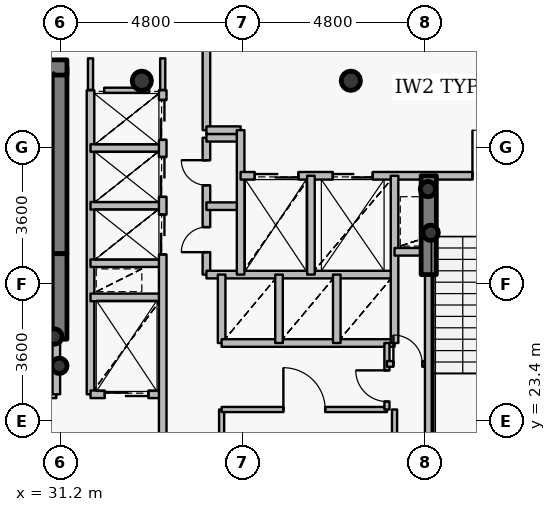
"""IFC4 building model, lengths in metres.
Left out: names, types, materials, properties, quantities, classifications, styles, units other than length and angle.
Written with IfcOpenShell. Run it as: python <this file> out.ifc"""

import sys

from ifc_helpers import new_model, si_unit, direction, frame, frame_2d, origin, origin_2d, place, context, subcontext, project, spatial, rectangle, hollow_circle, extrude, source, transform, mapped, element, fill, save


model = new_model("IFC4")
c1 = context("Model", 3, precision=1e-05, world=origin(), true_north=direction((0.0, 1.0)))
c2 = subcontext(c1, "Body", "Model", "MODEL_VIEW")
j1 = project(units=[si_unit("LENGTHUNIT", "METRE"), si_unit("PLANEANGLEUNIT", "RADIAN")], contexts=[c1])
p1 = place(None, origin())
s1 = spatial("IfcSite", under=j1, at=p1, CompositionType="ELEMENT")
p2 = place(p1, origin())
s2 = spatial("IfcBuilding", under=s1, at=p2, CompositionType="ELEMENT")
p3 = place(p2, frame((0.0, 0.0, 182.4)))
s3 = spatial("IfcBuildingStorey", under=s2, at=p3, CompositionType="ELEMENT", Elevation=182.4)
for number, where, z_axis, x_axis in (
    (1, (38.85, 32.35, 0.0), (0.0, 0.0, 1.0), (1.0, 0.0, 0.0)),
    (2, (33.35, 32.35, 0.0), (0.0, 0.0, 1.0), (1.0, 0.0, 0.0)),
):
    element("IfcColumn", number, at=place(p3, frame(where, z_axis=z_axis, x_axis=x_axis)), inside=s3, PredefinedType="COLUMN", context=c2, shape_type="SweptSolid", body=[
        extrude(hollow_circle(Radius=0.254, WallThickness=0.02, at=origin_2d()), origin(), (0.0, 0.0, 1.0), 3.75),
    ])
p4 = place(p3, frame((31.18, 27.8, 0.0), z_axis=(0.0, 0.0, 1.0), x_axis=(0.0, 1.0, 0.0)))
e3 = element("IfcWall", 3, at=p4, inside=s3, PredefinedType="SHEAR", context=c2, shape_type="SweptSolid", body=[
    extrude(rectangle(XDim=4.9, YDim=0.4, at=frame_2d((2.45, 0.0))), origin(), (0.0, 0.0, 1.0), 3.75),
])
p5 = place(p3, frame((27.28, 32.7, 0.0), z_axis=(0.0, 0.0, 1.0), x_axis=(1.0, 0.0, 0.0)))
e4 = element("IfcWall", 4, at=p5, inside=s3, PredefinedType="SHEAR", context=c2, shape_type="SweptSolid", body=[
    extrude(rectangle(XDim=4.1, YDim=0.4, at=frame_2d((2.05, 0.0))), origin(), (0.0, 0.0, 1.0), 3.75),
])
for number, where, z_axis, x_axis in (
    (5, (31.05, 25.62, 0.0), (0.0, 0.0, 1.0), (1.0, 0.0, 0.0)),
    (6, (31.18, 24.85, 0.0), (0.0, 0.0, 1.0), (1.0, 0.0, 0.0)),
    (7, (40.95, 28.35, 0.0), (0.0, 0.0, 1.0), (1.0, 0.0, 0.0)),
    (8, (40.88, 29.5, 0.0), (0.0, 0.0, 1.0), (1.0, 0.0, 0.0)),
):
    element("IfcColumn", number, at=place(p3, frame(where, z_axis=z_axis, x_axis=x_axis)), inside=s3, PredefinedType="COLUMN", context=c2, shape_type="SweptSolid", body=[
        extrude(hollow_circle(Radius=0.203, WallThickness=0.016, at=origin_2d()), origin(), (0.0, 0.0, 1.0), 3.75),
    ])
p6 = place(p3, frame((31.18, 25.55, 0.0), z_axis=(0.0, 0.0, 1.0), x_axis=(0.0, 1.0, 0.0)))
e9 = element("IfcWall", 9, at=p6, inside=s3, PredefinedType="SHEAR", context=c2, shape_type="SweptSolid", body=[
    extrude(rectangle(XDim=2.25, YDim=0.4, at=frame_2d((1.125, 0.0))), origin(), (0.0, 0.0, 1.0), 3.1),
])
p7 = place(p3, frame((40.9, 27.25, 0.0), z_axis=(0.0, 0.0, 1.0), x_axis=(0.0, 1.0, 0.0)))
e10 = element("IfcWall", 10, at=p7, inside=s3, PredefinedType="SHEAR", context=c2, shape_type="SweptSolid", body=[
    extrude(rectangle(XDim=2.6, YDim=0.4, at=frame_2d((1.3, 0.0))), origin(), (0.0, 0.0, 1.0), 3.1),
])
p8 = place(p3, frame((27.56, 24.1, 0.0), z_axis=(0.0, 0.0, 1.0), x_axis=(1.0, 0.0, 0.0)))
e11 = element("IfcWall", 11, at=p8, inside=s3, PredefinedType="PARTITIONING", context=c2, shape_type="SweptSolid", body=[
    extrude(rectangle(XDim=3.54, YDim=0.2, at=frame_2d((1.77, 0.0))), origin(), (0.0, 0.0, 1.0), 3.5),
])
p9 = place(p8, frame((1.17, 0.0, 0.0)))
e12 = element("IfcOpeningElement", 12, at=p9, cuts=e11, PredefinedType="OPENING", context=c2, shape_type="SweptSolid", body=[
    extrude(rectangle(XDim=1.2, YDim=2.15, at=origin_2d()), frame((0.6, 0.11, 1.075), z_axis=(0.0, -1.0, 0.0), x_axis=(1.0, 0.0, 0.0)), (0.0, 0.0, 1.0), 0.22),
])
p10 = place(p3, frame((31.1, 24.1, 0.0), z_axis=(0.0, 0.0, 1.0), x_axis=(0.0, 1.0, 0.0)))
e13 = element("IfcWall", 13, at=p10, inside=s3, PredefinedType="PARTITIONING", context=c2, shape_type="SweptSolid", body=[
    extrude(rectangle(XDim=1.44, YDim=0.2, at=frame_2d((0.72, 0.0))), origin(), (0.0, 0.0, 1.0), 3.5),
])
p11 = place(p3, frame((32.0, 24.1, 0.0), z_axis=(0.0, 0.0, 1.0), x_axis=(0.0, 1.0, 0.0)))
e14 = element("IfcWall", 14, at=p11, inside=s3, PredefinedType="PARTITIONING", context=c2, shape_type="SweptSolid", body=[
    extrude(rectangle(XDim=8.0, YDim=0.2, at=frame_2d((4.0, 0.0))), origin(), (0.0, 0.0, 1.0), 3.5),
])
p12 = place(p3, frame((32.0, 24.1, 0.0), z_axis=(0.0, 0.0, 1.0), x_axis=(1.0, 0.0, 0.0)))
e15 = element("IfcWall", 15, at=p12, inside=s3, PredefinedType="PARTITIONING", context=c2, shape_type="SweptSolid", body=[
    extrude(rectangle(XDim=1.9, YDim=0.2, at=frame_2d((0.95, 0.0))), origin(), (0.0, 0.0, 1.0), 3.085),
])
p13 = place(p12, frame((0.375, 0.0, 0.0)))
e16 = element("IfcOpeningElement", 16, at=p13, cuts=e15, PredefinedType="OPENING", context=c2, shape_type="SweptSolid", body=[
    extrude(rectangle(XDim=1.15, YDim=2.15, at=origin_2d()), frame((0.575, 0.11, 1.075), z_axis=(0.0, -1.0, 0.0), x_axis=(1.0, 0.0, 0.0)), (0.0, 0.0, 1.0), 0.22),
])
for number, where, z_axis, x_axis in (
    (17, (32.0, 26.65, 0.0), (0.0, 0.0, 1.0), (1.0, 0.0, 0.0)),
    (18, (32.0, 27.55, 0.0), (0.0, 0.0, 1.0), (1.0, 0.0, 0.0)),
    (19, (32.0, 29.06, 0.0), (0.0, 0.0, 1.0), (1.0, 0.0, 0.0)),
    (20, (32.0, 30.58, 0.0), (0.0, 0.0, 1.0), (1.0, 0.0, 0.0)),
):
    element("IfcWall", number, at=place(p3, frame(where, z_axis=z_axis, x_axis=x_axis)), inside=s3, PredefinedType="PARTITIONING", context=c2, shape_type="SweptSolid", body=[
        extrude(rectangle(XDim=1.9, YDim=0.2, at=frame_2d((0.95, 0.0))), origin(), (0.0, 0.0, 1.0), 3.085),
    ])
p14 = place(p3, frame((33.9, 20.8, 0.0), z_axis=(0.0, 0.0, 1.0), x_axis=(0.0, 1.0, 0.0)))
e21 = element("IfcWall", 21, at=p14, inside=s3, PredefinedType="PARTITIONING", context=c2, shape_type="SweptSolid", body=[
    extrude(rectangle(XDim=11.3, YDim=0.2, at=frame_2d((5.65, 0.0))), origin(), (0.0, 0.0, 1.0), 3.085),
])
p15 = place(p14, frame((6.98, 0.0, 0.0)))
e22 = element("IfcOpeningElement", 22, at=p15, cuts=e21, PredefinedType="OPENING", context=c2, shape_type="SweptSolid", body=[
    extrude(rectangle(XDim=1.05, YDim=2.15, at=origin_2d()), frame((0.525, 0.11, 1.075), z_axis=(0.0, -1.0, 0.0), x_axis=(1.0, 0.0, 0.0)), (0.0, 0.0, 1.0), 0.22),
])
p16 = place(p14, frame((8.495, 0.0, 0.0)))
e23 = element("IfcOpeningElement", 23, at=p16, cuts=e21, PredefinedType="OPENING", context=c2, shape_type="SweptSolid", body=[
    extrude(rectangle(XDim=1.05, YDim=2.15, at=origin_2d()), frame((0.525, 0.11, 1.075), z_axis=(0.0, -1.0, 0.0), x_axis=(1.0, 0.0, 0.0)), (0.0, 0.0, 1.0), 0.22),
])
p17 = place(p14, frame((9.995, 0.0, 0.0)))
e24 = element("IfcOpeningElement", 24, at=p17, cuts=e21, PredefinedType="OPENING", context=c2, shape_type="SweptSolid", body=[
    extrude(rectangle(XDim=1.05, YDim=2.15, at=origin_2d()), frame((0.525, 0.11, 1.075), z_axis=(0.0, -1.0, 0.0), x_axis=(1.0, 0.0, 0.0)), (0.0, 0.0, 1.0), 0.22),
])
p18 = place(p3, frame((35.05, 27.25, 0.0), z_axis=(0.0, 0.0, 1.0), x_axis=(0.0, 1.0, 0.0)))
e25 = element("IfcWall", 25, at=p18, inside=s3, PredefinedType="PARTITIONING", context=c2, shape_type="SweptSolid", body=[
    extrude(rectangle(XDim=3.6, YDim=0.2, at=frame_2d((1.8, 0.0))), origin(), (0.0, 0.0, 1.0), 3.5),
])
p19 = place(p18, frame((0.59, 0.0, 0.0)))
e26 = element("IfcOpeningElement", 26, at=p19, cuts=e25, PredefinedType="OPENING", context=c2, shape_type="SweptSolid", body=[
    extrude(rectangle(XDim=0.66, YDim=2.05, at=origin_2d()), frame((0.33, 0.11, 1.025), z_axis=(0.0, -1.0, 0.0), x_axis=(1.0, 0.0, 0.0)), (0.0, 0.0, 1.0), 0.22),
])
p20 = place(p18, frame((2.35, 0.0, 0.0)))
e27 = element("IfcOpeningElement", 27, at=p20, cuts=e25, PredefinedType="OPENING", context=c2, shape_type="SweptSolid", body=[
    extrude(rectangle(XDim=0.66, YDim=2.05, at=origin_2d()), frame((0.33, 0.11, 1.025), z_axis=(0.0, -1.0, 0.0), x_axis=(1.0, 0.0, 0.0)), (0.0, 0.0, 1.0), 0.22),
])
p21 = place(p3, frame((35.05, 27.25, 0.0), z_axis=(0.0, 0.0, 1.0), x_axis=(1.0, 0.0, 0.0)))
e28 = element("IfcWall", 28, at=p21, inside=s3, PredefinedType="PARTITIONING", context=c2, shape_type="SweptSolid", body=[
    extrude(rectangle(XDim=4.95, YDim=0.2, at=frame_2d((2.475, 0.0))), origin(), (0.0, 0.0, 1.0), 3.085),
])
for number, where, z_axis, x_axis in (
    (29, (35.05, 29.05, 0.0), (0.0, 0.0, 1.0), (1.0, 0.0, 0.0)),
    (30, (35.05, 30.85, 0.0), (0.0, 0.0, 1.0), (1.0, 0.0, 0.0)),
):
    element("IfcWall", number, at=place(p3, frame(where, z_axis=z_axis, x_axis=x_axis)), inside=s3, PredefinedType="PARTITIONING", context=c2, shape_type="SweptSolid", body=[
        extrude(rectangle(XDim=0.9, YDim=0.2, at=frame_2d((0.45, 0.0))), origin(), (0.0, 0.0, 1.0), 3.5),
    ])
p22 = place(p3, frame((35.05, 31.05, 0.0), z_axis=(0.0, 0.0, 1.0), x_axis=(0.0, 1.0, 0.0)))
e31 = element("IfcWall", 31, at=p22, inside=s3, PredefinedType="PARTITIONING", context=c2, shape_type="SweptSolid", body=[
    extrude(rectangle(XDim=2.15, YDim=0.2, at=frame_2d((1.075, 0.0))), origin(), (0.0, 0.0, 1.0), 3.085),
])
p23 = place(p3, frame((35.05, 31.05, 0.0), z_axis=(0.0, 0.0, 1.0), x_axis=(1.0, 0.0, 0.0)))
e32 = element("IfcWall", 32, at=p23, inside=s3, PredefinedType="PARTITIONING", context=c2, shape_type="SweptSolid", body=[
    extrude(rectangle(XDim=0.9, YDim=0.2, at=frame_2d((0.45, 0.0))), origin(), (0.0, 0.0, 1.0), 3.5),
])
p24 = place(p3, frame((35.45, 20.8, 0.0), z_axis=(0.0, 0.0, 1.0), x_axis=(0.0, 1.0, 0.0)))
e33 = element("IfcWall", 33, at=p24, inside=s3, PredefinedType="PARTITIONING", context=c2, shape_type="SweptSolid", body=[
    extrude(rectangle(XDim=2.9, YDim=0.135, at=frame_2d((1.45, 0.0))), origin(), (0.0, 0.0, 1.0), 3.085),
])
p25 = place(p3, frame((35.45, 23.7, 0.0), z_axis=(0.0, 0.0, 1.0), x_axis=(1.0, 0.0, 0.0)))
e34 = element("IfcWall", 34, at=p25, inside=s3, PredefinedType="PARTITIONING", context=c2, shape_type="SweptSolid", body=[
    extrude(rectangle(XDim=4.35, YDim=0.135, at=frame_2d((2.175, 0.0))), origin(), (0.0, 0.0, 1.0), 3.085),
])
p26 = place(p25, frame((1.625, 0.0, 0.0)))
e35 = element("IfcOpeningElement", 35, at=p26, cuts=e34, PredefinedType="OPENING", context=c2, shape_type="SweptSolid", body=[
    extrude(rectangle(XDim=1.1, YDim=2.15, at=origin_2d()), frame((0.55, 0.078, 1.075), z_axis=(0.0, -1.0, 0.0), x_axis=(1.0, 0.0, 0.0)), (0.0, 0.0, 1.0), 0.155),
])
p27 = place(p3, frame((35.45, 25.45, 0.0), z_axis=(0.0, 0.0, 1.0), x_axis=(0.0, 1.0, 0.0)))
e36 = element("IfcWall", 36, at=p27, inside=s3, PredefinedType="PARTITIONING", context=c2, shape_type="SweptSolid", body=[
    extrude(rectangle(XDim=1.8, YDim=0.2, at=frame_2d((0.9, 0.0))), origin(), (0.0, 0.0, 1.0), 3.5),
])
p28 = place(p3, frame((35.45, 25.45, 0.0), z_axis=(0.0, 0.0, 1.0), x_axis=(1.0, 0.0, 0.0)))
e37 = element("IfcWall", 37, at=p28, inside=s3, PredefinedType="PARTITIONING", context=c2, shape_type="SweptSolid", body=[
    extrude(rectangle(XDim=4.55, YDim=0.2, at=frame_2d((2.275, 0.0))), origin(), (0.0, 0.0, 1.0), 3.085),
])
p29 = place(p3, frame((35.95, 27.25, 0.0), z_axis=(0.0, 0.0, 1.0), x_axis=(0.0, 1.0, 0.0)))
e38 = element("IfcWall", 38, at=p29, inside=s3, PredefinedType="PARTITIONING", context=c2, shape_type="SweptSolid", body=[
    extrude(rectangle(XDim=3.8, YDim=0.2, at=frame_2d((1.9, 0.0))), origin(), (0.0, 0.0, 1.0), 3.5),
])
p30 = place(p3, frame((35.95, 29.85, 0.0), z_axis=(0.0, 0.0, 1.0), x_axis=(1.0, 0.0, 0.0)))
e39 = element("IfcWall", 39, at=p30, inside=s3, PredefinedType="PARTITIONING", context=c2, shape_type="SweptSolid", body=[
    extrude(rectangle(XDim=8.49, YDim=0.2, at=frame_2d((4.245, 0.0))), origin(), (0.0, 0.0, 1.0), 3.085),
])
p31 = place(p30, frame((6.1, 0.0, 0.0)))
e40 = element("IfcOpeningElement", 40, at=p31, cuts=e39, PredefinedType="OPENING", context=c2, shape_type="SweptSolid", body=[
    extrude(rectangle(XDim=1.2, YDim=2.15, at=origin_2d()), frame((0.6, 0.11, 1.075), z_axis=(0.0, -1.0, 0.0), x_axis=(1.0, 0.0, 0.0)), (0.0, 0.0, 1.0), 0.22),
])
p32 = place(p30, frame((0.37, 0.0, 0.0)))
e41 = element("IfcOpeningElement", 41, at=p32, cuts=e39, PredefinedType="OPENING", context=c2, shape_type="SweptSolid", body=[
    extrude(rectangle(XDim=1.15, YDim=2.15, at=origin_2d()), frame((0.575, 0.11, 1.075), z_axis=(0.0, -1.0, 0.0), x_axis=(1.0, 0.0, 0.0)), (0.0, 0.0, 1.0), 0.22),
])
p33 = place(p30, frame((2.425, 0.0, 0.0)))
e42 = element("IfcOpeningElement", 42, at=p33, cuts=e39, PredefinedType="OPENING", context=c2, shape_type="SweptSolid", body=[
    extrude(rectangle(XDim=1.05, YDim=2.15, at=origin_2d()), frame((0.525, 0.11, 1.075), z_axis=(0.0, -1.0, 0.0), x_axis=(1.0, 0.0, 0.0)), (0.0, 0.0, 1.0), 0.22),
])
p34 = place(p3, frame((36.96, 25.45, 0.0), z_axis=(0.0, 0.0, 1.0), x_axis=(0.0, 1.0, 0.0)))
e43 = element("IfcWall", 43, at=p34, inside=s3, PredefinedType="PARTITIONING", context=c2, shape_type="SweptSolid", body=[
    extrude(rectangle(XDim=1.8, YDim=0.2, at=frame_2d((0.9, 0.0))), origin(), (0.0, 0.0, 1.0), 3.5),
])
p35 = place(p3, frame((37.8, 27.25, 0.0), z_axis=(0.0, 0.0, 1.0), x_axis=(0.0, 1.0, 0.0)))
e44 = element("IfcWall", 44, at=p35, inside=s3, PredefinedType="PARTITIONING", context=c2, shape_type="SweptSolid", body=[
    extrude(rectangle(XDim=2.6, YDim=0.2, at=frame_2d((1.3, 0.0))), origin(), (0.0, 0.0, 1.0), 3.5),
])
p36 = place(p3, frame((38.48, 25.45, 0.0), z_axis=(0.0, 0.0, 1.0), x_axis=(0.0, 1.0, 0.0)))
e45 = element("IfcWall", 45, at=p36, inside=s3, PredefinedType="PARTITIONING", context=c2, shape_type="SweptSolid", body=[
    extrude(rectangle(XDim=1.8, YDim=0.2, at=frame_2d((0.9, 0.0))), origin(), (0.0, 0.0, 1.0), 3.5),
])
p37 = place(p3, frame((39.8, 23.7, 0.0), z_axis=(0.0, 0.0, 1.0), x_axis=(0.0, 1.0, 0.0)))
e46 = element("IfcWall", 46, at=p37, inside=s3, PredefinedType="PARTITIONING", context=c2, shape_type="SweptSolid", body=[
    extrude(rectangle(XDim=1.75, YDim=0.135, at=frame_2d((0.875, 0.0))), origin(), (0.0, 0.0, 1.0), 3.5),
])
p38 = place(p37, frame((0.21, 0.0, 0.0)))
e47 = element("IfcOpeningElement", 47, at=p38, cuts=e46, PredefinedType="OPENING", context=c2, shape_type="SweptSolid", body=[
    extrude(rectangle(XDim=0.82, YDim=2.1, at=origin_2d()), frame((0.41, 0.078, 1.05), z_axis=(0.0, -1.0, 0.0), x_axis=(1.0, 0.0, 0.0)), (0.0, 0.0, 1.0), 0.155),
])
p39 = place(p3, frame((39.8, 24.9, 0.0), z_axis=(0.0, 0.0, 1.0), x_axis=(1.0, 0.0, 0.0)))
e48 = element("IfcWall", 48, at=p39, inside=s3, PredefinedType="PARTITIONING", context=c2, shape_type="SweptSolid", body=[
    extrude(rectangle(XDim=1.1, YDim=0.15, at=frame_2d((0.55, 0.0))), origin(), (0.0, 0.0, 1.0), 3.5),
])
p40 = place(p39, frame((0.17, 0.0, 0.0)))
e49 = element("IfcOpeningElement", 49, at=p40, cuts=e48, PredefinedType="OPENING", context=c2, shape_type="SweptSolid", body=[
    extrude(rectangle(XDim=0.76, YDim=2.1, at=origin_2d()), frame((0.38, 0.085, 1.05), z_axis=(0.0, -1.0, 0.0), x_axis=(1.0, 0.0, 0.0)), (0.0, 0.0, 1.0), 0.17),
])
p41 = place(p3, frame((40.0, 25.45, 0.0), z_axis=(0.0, 0.0, 1.0), x_axis=(0.0, 1.0, 0.0)))
e50 = element("IfcWall", 50, at=p41, inside=s3, PredefinedType="PARTITIONING", context=c2, shape_type="SweptSolid", body=[
    extrude(rectangle(XDim=4.4, YDim=0.2, at=frame_2d((2.2, 0.0))), origin(), (0.0, 0.0, 1.0), 3.5),
])
p42 = place(p3, frame((40.0, 27.85, 0.0), z_axis=(0.0, 0.0, 1.0), x_axis=(1.0, 0.0, 0.0)))
e51 = element("IfcWall", 51, at=p42, inside=s3, PredefinedType="PARTITIONING", context=c2, shape_type="SweptSolid", body=[
    extrude(rectangle(XDim=0.9, YDim=0.2, at=frame_2d((0.45, 0.0))), origin(), (0.0, 0.0, 1.0), 3.5),
])
p43 = place(p3, frame((40.9, 21.33, 0.0), z_axis=(0.0, 0.0, 1.0), x_axis=(0.0, 1.0, 0.0)))
e52 = element("IfcWall", 52, at=p43, inside=s3, PredefinedType="PARTITIONING", context=c2, shape_type="SweptSolid", body=[
    extrude(rectangle(XDim=5.91, YDim=0.2, at=frame_2d((2.955, 0.0))), origin(), (0.0, 0.0, 1.0), 3.035),
])
p44 = place(p3, frame((32.36, 32.1, 0.0), z_axis=(0.0, 0.0, 1.0), x_axis=(1.0, 0.0, 0.0)))
e53 = element("IfcWall", 53, at=p44, inside=s3, PredefinedType="PARTITIONING", context=c2, shape_type="SweptSolid", body=[
    extrude(rectangle(XDim=1.18, YDim=0.135, at=frame_2d((0.59, 0.0))), origin(), (0.0, 0.0, 1.0), 3.085),
])
p45 = place(p3, frame((40.0, 23.7, 0.0), z_axis=(0.0, 0.0, 1.0), x_axis=(0.0, -1.0, 0.0)))
e54 = element("IfcWall", 54, at=p45, inside=s3, PredefinedType="PARTITIONING", context=c2, shape_type="SweptSolid", body=[
    extrude(rectangle(XDim=2.64, YDim=0.135, at=frame_2d((1.32, 0.0))), origin(), (0.0, 0.0, 1.0), 3.035),
])
p46 = place(p3, frame((32.0, 32.94, 0.0), z_axis=(0.0, 0.0, 1.0), x_axis=(0.0, -1.0, 0.0)))
e55 = element("IfcWall", 55, at=p46, inside=s3, PredefinedType="PARTITIONING", context=c2, shape_type="SweptSolid", body=[
    extrude(rectangle(XDim=0.83, YDim=0.135, at=frame_2d((0.415, 0.0))), origin(), (0.0, 0.0, 1.0), 3.035),
])
p47 = place(p3, frame((33.9, 32.11, 0.0), z_axis=(0.0, 0.0, 1.0), x_axis=(0.0, 1.0, 0.0)))
e56 = element("IfcWall", 56, at=p47, inside=s3, PredefinedType="PARTITIONING", context=c2, shape_type="SweptSolid", body=[
    extrude(rectangle(XDim=0.83, YDim=0.135, at=frame_2d((0.415, 0.0))), origin(), (0.0, 0.0, 1.0), 3.085),
])
m1 = source(origin(), c2, "Body", "SweptSolid", [
    extrude(rectangle(XDim=1.2, YDim=2.15, at=origin_2d()), frame((0.6, 0.025, 1.075), z_axis=(0.0, -1.0, 0.0), x_axis=(1.0, 0.0, 0.0)), (0.0, 0.0, 1.0), 0.05),
])
p48 = place(p31, origin())
e57 = element("IfcDoor", 57, at=p48, inside=s3, OperationType="SINGLE_SWING_LEFT", PredefinedType="DOOR", context=c2, shape_type="MappedRepresentation", body=[
    mapped(m1, transform((0.0, 0.0, 0.0), x_axis=(1.0, 0.0, 0.0), y_axis=(0.0, 1.0, 0.0), z_axis=(0.0, 0.0, 1.0), scale=1.0)),
])
fill(e40, e57)
m2 = source(origin(), c2, "Body", "SweptSolid", [
    extrude(rectangle(XDim=1.15, YDim=2.15, at=origin_2d()), frame((0.575, 0.025, 1.075), z_axis=(0.0, -1.0, 0.0), x_axis=(1.0, 0.0, 0.0)), (0.0, 0.0, 1.0), 0.05),
])
p49 = place(p32, origin())
e58 = element("IfcDoor", 58, at=p49, inside=s3, OperationType="DOUBLE_DOOR_SLIDING", PredefinedType="USERDEFINED", context=c2, shape_type="MappedRepresentation", body=[
    mapped(m2, transform((0.0, 0.0, 0.0), x_axis=(1.0, 0.0, 0.0), y_axis=(0.0, 1.0, 0.0), z_axis=(0.0, 0.0, 1.0), scale=1.0)),
])
fill(e41, e58)
p50 = place(p13, origin())
e59 = element("IfcDoor", 59, at=p50, inside=s3, OperationType="DOUBLE_DOOR_SLIDING", PredefinedType="USERDEFINED", context=c2, shape_type="MappedRepresentation", body=[
    mapped(m2, transform((0.0, 0.0, 0.0), x_axis=(1.0, 0.0, 0.0), y_axis=(0.0, 1.0, 0.0), z_axis=(0.0, 0.0, 1.0), scale=1.0)),
])
fill(e16, e59)
m3 = source(origin(), c2, "Body", "SweptSolid", [
    extrude(rectangle(XDim=1.05, YDim=2.15, at=origin_2d()), frame((0.525, 0.025, 1.075), z_axis=(0.0, -1.0, 0.0), x_axis=(1.0, 0.0, 0.0)), (0.0, 0.0, 1.0), 0.05),
])
p51 = place(p33, origin())
e60 = element("IfcDoor", 60, at=p51, inside=s3, OperationType="DOUBLE_DOOR_SLIDING", PredefinedType="USERDEFINED", context=c2, shape_type="MappedRepresentation", body=[
    mapped(m3, transform((0.0, 0.0, 0.0), x_axis=(1.0, 0.0, 0.0), y_axis=(0.0, 1.0, 0.0), z_axis=(0.0, 0.0, 1.0), scale=1.0)),
])
fill(e42, e60)
p52 = place(p15, origin())
e61 = element("IfcDoor", 61, at=p52, inside=s3, OperationType="DOUBLE_DOOR_SLIDING", PredefinedType="USERDEFINED", context=c2, shape_type="MappedRepresentation", body=[
    mapped(m3, transform((0.0, 0.0, 0.0), x_axis=(1.0, 0.0, 0.0), y_axis=(0.0, 1.0, 0.0), z_axis=(0.0, 0.0, 1.0), scale=1.0)),
])
fill(e22, e61)
p53 = place(p16, origin())
e62 = element("IfcDoor", 62, at=p53, inside=s3, OperationType="DOUBLE_DOOR_SLIDING", PredefinedType="USERDEFINED", context=c2, shape_type="MappedRepresentation", body=[
    mapped(m3, transform((0.0, 0.0, 0.0), x_axis=(1.0, 0.0, 0.0), y_axis=(0.0, 1.0, 0.0), z_axis=(0.0, 0.0, 1.0), scale=1.0)),
])
fill(e23, e62)
p54 = place(p17, origin())
e63 = element("IfcDoor", 63, at=p54, inside=s3, OperationType="DOUBLE_DOOR_SLIDING", PredefinedType="USERDEFINED", context=c2, shape_type="MappedRepresentation", body=[
    mapped(m3, transform((0.0, 0.0, 0.0), x_axis=(1.0, 0.0, 0.0), y_axis=(0.0, 1.0, 0.0), z_axis=(0.0, 0.0, 1.0), scale=1.0)),
])
fill(e24, e63)
m4 = source(origin(), c2, "Body", "SweptSolid", [
    extrude(rectangle(XDim=0.66, YDim=2.05, at=origin_2d()), frame((0.33, 0.025, 1.025), z_axis=(0.0, -1.0, 0.0), x_axis=(1.0, 0.0, 0.0)), (0.0, 0.0, 1.0), 0.05),
])
p55 = place(p19, origin())
e64 = element("IfcDoor", 64, at=p55, inside=s3, OperationType="SINGLE_SWING_LEFT", PredefinedType="USERDEFINED", context=c2, shape_type="MappedRepresentation", body=[
    mapped(m4, transform((0.0, 0.0, 0.0), x_axis=(1.0, 0.0, 0.0), y_axis=(0.0, 1.0, 0.0), z_axis=(0.0, 0.0, 1.0), scale=1.0)),
])
fill(e26, e64)
p56 = place(p20, origin())
e65 = element("IfcDoor", 65, at=p56, inside=s3, OperationType="SINGLE_SWING_RIGHT", PredefinedType="USERDEFINED", context=c2, shape_type="MappedRepresentation", body=[
    mapped(m4, transform((0.0, 0.0, 0.0), x_axis=(1.0, 0.0, 0.0), y_axis=(0.0, 1.0, 0.0), z_axis=(0.0, 0.0, 1.0), scale=1.0)),
])
fill(e27, e65)
m5 = source(origin(), c2, "Body", "SweptSolid", [
    extrude(rectangle(XDim=1.1, YDim=2.15, at=origin_2d()), frame((0.55, 0.025, 1.075), z_axis=(0.0, -1.0, 0.0), x_axis=(1.0, 0.0, 0.0)), (0.0, 0.0, 1.0), 0.05),
])
p57 = place(p26, origin())
e66 = element("IfcDoor", 66, at=p57, inside=s3, OperationType="SINGLE_SWING_LEFT", PredefinedType="DOOR", context=c2, shape_type="MappedRepresentation", body=[
    mapped(m5, transform((0.0, 0.0, 0.0), x_axis=(1.0, 0.0, 0.0), y_axis=(0.0, 1.0, 0.0), z_axis=(0.0, 0.0, 1.0), scale=1.0)),
])
fill(e35, e66)
m6 = source(origin(), c2, "Body", "SweptSolid", [
    extrude(rectangle(XDim=0.82, YDim=2.1, at=origin_2d()), frame((0.41, 0.025, 1.05), z_axis=(0.0, -1.0, 0.0), x_axis=(1.0, 0.0, 0.0)), (0.0, 0.0, 1.0), 0.05),
])
p58 = place(p38, origin())
e67 = element("IfcDoor", 67, at=p58, inside=s3, OperationType="SINGLE_SWING_RIGHT", PredefinedType="DOOR", context=c2, shape_type="MappedRepresentation", body=[
    mapped(m6, transform((0.0, 0.0, 0.0), x_axis=(1.0, 0.0, 0.0), y_axis=(0.0, 1.0, 0.0), z_axis=(0.0, 0.0, 1.0), scale=1.0)),
])
fill(e47, e67)
m7 = source(origin(), c2, "Body", "SweptSolid", [
    extrude(rectangle(XDim=0.76, YDim=2.1, at=origin_2d()), frame((0.38, 0.025, 1.05), z_axis=(0.0, -1.0, 0.0), x_axis=(1.0, 0.0, 0.0)), (0.0, 0.0, 1.0), 0.05),
])
p59 = place(p40, origin())
e68 = element("IfcDoor", 68, at=p59, inside=s3, OperationType="SINGLE_SWING_LEFT", PredefinedType="DOOR", context=c2, shape_type="MappedRepresentation", body=[
    mapped(m7, transform((0.0, 0.0, 0.0), x_axis=(1.0, 0.0, 0.0), y_axis=(0.0, 1.0, 0.0), z_axis=(0.0, 0.0, 1.0), scale=1.0)),
])
fill(e49, e68)
save(model, sys.argv[1])
